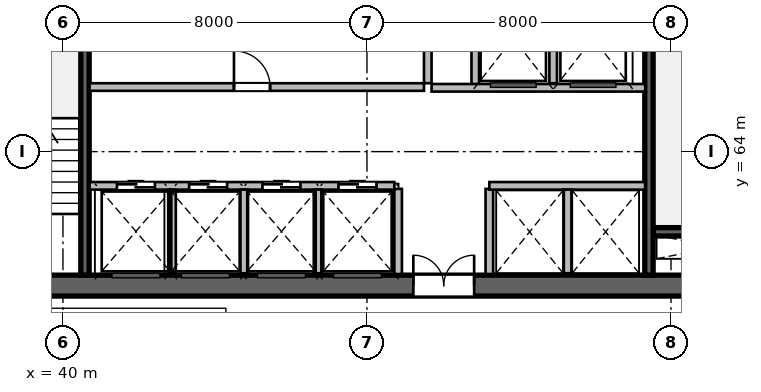
"""IFC4 building model, lengths in metres.
Left out: names, types, materials, properties, quantities, classifications, styles, units other than length and angle.
Written with IfcOpenShell. Run it as: python <this file> out.ifc"""

import sys

from ifc_helpers import new_model, si_unit, direction, frame, frame_2d, origin, place, context, subcontext, project, spatial, rectangle, extrude, source, transform, mapped, element, fill, save


model = new_model("IFC4")
c1 = context("Model", 3, precision=1e-05, world=origin(), true_north=direction((0.0, 1.0)))
c2 = subcontext(c1, "Body", "Model", "MODEL_VIEW")
j1 = project(units=[si_unit("LENGTHUNIT", "METRE"), si_unit("PLANEANGLEUNIT", "RADIAN")], contexts=[c1])
p1 = place(None, origin())
s1 = spatial("IfcSite", under=j1, at=p1, CompositionType="ELEMENT")
p2 = place(p1, origin())
s2 = spatial("IfcBuilding", under=s1, at=p2, CompositionType="ELEMENT")
p3 = place(p2, frame((0.0, 0.0, 49.8)))
s3 = spatial("IfcBuildingStorey", under=s2, at=p3, CompositionType="ELEMENT", Elevation=49.8)
m1 = source(origin(), c2, "Body", "SweptSolid", [
    extrude(rectangle(XDim=21.6, YDim=0.55, at=frame_2d((10.8, 0.0))), origin(), (0.0, 0.0, 1.0), 3.6),
])
p4 = place(p3, frame((37.2, 60.475, 0.0), z_axis=(0.0, 0.0, 1.0), x_axis=(1.0, 0.0, 0.0)))
e1 = element("IfcWall", 1, at=p4, inside=s3, PredefinedType="SHEAR", context=c2, shape_type="MappedRepresentation", body=[
    mapped(m1, transform((0.0, 0.0, 0.0), scale=1.0)),
])
p5 = place(p4, frame((1.1, 0.0, 0.0)))
e2 = element("IfcOpeningElement", 2, at=p5, cuts=e1, PredefinedType="OPENING", context=c2, shape_type="SweptSolid", body=[
    extrude(rectangle(XDim=1.15, YDim=2.15, at=frame_2d((0.575, 1.075))), frame((0.0, 0.285, 0.0), z_axis=(0.0, -1.0, 0.0), x_axis=(1.0, 0.0, 0.0)), (0.0, 0.0, 1.0), 0.57),
])
p6 = place(p4, frame((19.5, 0.0, 0.0)))
e3 = element("IfcOpeningElement", 3, at=p6, cuts=e1, PredefinedType="OPENING", context=c2, shape_type="SweptSolid", body=[
    extrude(rectangle(XDim=0.9, YDim=2.1, at=frame_2d((0.45, 1.05))), frame((0.0, 0.285, 0.0), z_axis=(0.0, -1.0, 0.0), x_axis=(1.0, 0.0, 0.0)), (0.0, 0.0, 1.0), 0.57),
])
p7 = place(p4, frame((12.02, 0.0, 0.0)))
e4 = element("IfcOpeningElement", 4, at=p7, cuts=e1, PredefinedType="OPENING", context=c2, shape_type="SweptSolid", body=[
    extrude(rectangle(XDim=1.6, YDim=2.15, at=frame_2d((0.8, 1.075))), frame((0.0, 0.285, 0.0), z_axis=(0.0, -1.0, 0.0), x_axis=(1.0, 0.0, 0.0)), (0.0, 0.0, 1.0), 0.57),
])
m2 = source(origin(), c2, "Body", "SweptSolid", [
    extrude(rectangle(XDim=3.27, YDim=0.22, at=frame_2d((1.635, 0.0))), origin(), (0.0, 0.0, 1.0), 3.6),
])
p8 = place(p3, frame((55.53, 61.89, 0.0), z_axis=(0.0, 0.0, 1.0), x_axis=(1.0, 0.0, 0.0)))
e5 = element("IfcWall", 5, at=p8, inside=s3, PredefinedType="SHEAR", context=c2, shape_type="MappedRepresentation", body=[
    mapped(m2, transform((0.0, 0.0, 0.0), scale=1.0)),
])
m3 = source(origin(), c2, "Body", "SweptSolid", [
    extrude(rectangle(XDim=10.9, YDim=0.22, at=frame_2d((5.45, 0.0))), origin(), (0.0, 0.0, 1.0), 3.6),
])
p9 = place(p3, frame((40.58, 60.75, 0.0), z_axis=(0.0, 0.0, 1.0), x_axis=(0.0, 1.0, 0.0)))
e6 = element("IfcWall", 6, at=p9, inside=s3, PredefinedType="SHEAR", context=c2, shape_type="MappedRepresentation", body=[
    mapped(m3, transform((0.0, 0.0, 0.0), scale=1.0)),
])
p10 = place(p3, frame((55.42, 60.75, 0.0), z_axis=(0.0, 0.0, 1.0), x_axis=(0.0, 1.0, 0.0)))
e7 = element("IfcWall", 7, at=p10, inside=s3, PredefinedType="SHEAR", context=c2, shape_type="MappedRepresentation", body=[
    mapped(m3, transform((0.0, 0.0, 0.0), scale=1.0)),
])
p11 = place(p10, frame((9.495, 0.0, 0.0)))
e8 = element("IfcOpeningElement", 8, at=p11, cuts=e7, PredefinedType="OPENING", context=c2, shape_type="SweptSolid", body=[
    extrude(rectangle(XDim=1.15, YDim=2.15, at=frame_2d((0.575, 1.075))), frame((0.0, 0.12, 0.0), z_axis=(0.0, -1.0, 0.0), x_axis=(1.0, 0.0, 0.0)), (0.0, 0.0, 1.0), 0.24),
])
m4 = source(origin(), c2, "Body", "SweptSolid", [
    extrude(rectangle(XDim=2.24, YDim=0.2, at=frame_2d((1.12, 0.0))), origin(), (0.0, 0.0, 1.0), 3.36),
])
for number, where, z_axis, x_axis in (
    (9, (48.82, 60.78, 0.0), (0.0, 0.0, 1.0), (0.0, 1.0, 0.0)),
    (10, (51.22, 60.78, 0.0), (0.0, 0.0, 1.0), (0.0, 1.0, 0.0)),
):
    element("IfcWall", number, at=place(p3, frame(where, z_axis=z_axis, x_axis=x_axis)), inside=s3, PredefinedType="SOLIDWALL", context=c2, shape_type="MappedRepresentation", body=[
        mapped(m4, transform((0.0, 0.0, 0.0), scale=1.0)),
    ])
m5 = source(origin(), c2, "Body", "SweptSolid", [
    extrude(rectangle(XDim=5.8, YDim=0.2, at=frame_2d((2.9, 0.0))), origin(), (0.0, 0.0, 1.0), 3.36),
])
p12 = place(p3, frame((49.6, 65.8, 0.0), z_axis=(0.0, 0.0, 1.0), x_axis=(0.0, 1.0, 0.0)))
e11 = element("IfcWall", 11, at=p12, inside=s3, PredefinedType="SOLIDWALL", context=c2, shape_type="MappedRepresentation", body=[
    mapped(m5, transform((0.0, 0.0, 0.0), scale=1.0)),
])
m6 = source(origin(), c2, "Body", "SweptSolid", [
    extrude(rectangle(XDim=2.58, YDim=0.2, at=frame_2d((1.29, 0.0))), origin(), (0.0, 0.0, 1.0), 3.36),
])
p13 = place(p3, frame((50.85, 65.68, 0.0), z_axis=(0.0, 0.0, 1.0), x_axis=(0.0, 1.0, 0.0)))
e12 = element("IfcWall", 12, at=p13, inside=s3, PredefinedType="SOLIDWALL", context=c2, shape_type="MappedRepresentation", body=[
    mapped(m6, transform((0.0, 0.0, 0.0), scale=1.0)),
])
m7 = source(origin(), c2, "Body", "SweptSolid", [
    extrude(rectangle(XDim=2.4, YDim=0.2, at=frame_2d((1.2, 0.0))), origin(), (0.0, 0.0, 1.0), 3.36),
])
p14 = place(p3, frame((52.9, 65.8, 0.0), z_axis=(0.0, 0.0, 1.0), x_axis=(0.0, 1.0, 0.0)))
e13 = element("IfcWall", 13, at=p14, inside=s3, PredefinedType="SOLIDWALL", context=c2, shape_type="MappedRepresentation", body=[
    mapped(m7, transform((0.0, 0.0, 0.0), scale=1.0)),
])
m8 = source(origin(), c2, "Body", "SweptSolid", [
    extrude(rectangle(XDim=5.62, YDim=0.2, at=frame_2d((2.81, 0.0))), origin(), (0.0, 0.0, 1.0), 3.36),
])
p15 = place(p3, frame((49.7, 65.68, 0.0), z_axis=(0.0, 0.0, 1.0), x_axis=(1.0, 0.0, 0.0)))
e14 = element("IfcWall", 14, at=p15, inside=s3, PredefinedType="SOLIDWALL", context=c2, shape_type="MappedRepresentation", body=[
    mapped(m8, transform((0.0, 0.0, 0.0), scale=1.0)),
])
m9 = source(origin(), c2, "Body", "SweptSolid", [
    extrude(rectangle(XDim=8.02, YDim=0.2, at=frame_2d((4.01, 0.0))), origin(), (0.0, 0.0, 1.0), 3.36),
])
p16 = place(p3, frame((40.7, 63.1, 0.0), z_axis=(0.0, 0.0, 1.0), x_axis=(1.0, 0.0, 0.0)))
e15 = element("IfcWall", 15, at=p16, inside=s3, PredefinedType="SOLIDWALL", context=c2, shape_type="MappedRepresentation", body=[
    mapped(m9, transform((0.0, 0.0, 0.0), scale=1.0)),
])
p17 = place(p16, frame((0.72, 0.0, 0.0)))
e16 = element("IfcOpeningElement", 16, at=p17, cuts=e15, PredefinedType="OPENING", context=c2, shape_type="SweptSolid", body=[
    extrude(rectangle(XDim=1.0, YDim=2.15, at=frame_2d((0.5, 1.075))), frame((0.0, 0.11, 0.0), z_axis=(0.0, -1.0, 0.0), x_axis=(1.0, 0.0, 0.0)), (0.0, 0.0, 1.0), 0.22),
])
p18 = place(p16, frame((2.62, 0.0, 0.0)))
e17 = element("IfcOpeningElement", 17, at=p18, cuts=e15, PredefinedType="OPENING", context=c2, shape_type="SweptSolid", body=[
    extrude(rectangle(XDim=1.0, YDim=2.15, at=frame_2d((0.5, 1.075))), frame((0.0, 0.11, 0.0), z_axis=(0.0, -1.0, 0.0), x_axis=(1.0, 0.0, 0.0)), (0.0, 0.0, 1.0), 0.22),
])
p19 = place(p16, frame((4.55, 0.0, 0.0)))
e18 = element("IfcOpeningElement", 18, at=p19, cuts=e15, PredefinedType="OPENING", context=c2, shape_type="SweptSolid", body=[
    extrude(rectangle(XDim=1.0, YDim=2.15, at=frame_2d((0.5, 1.075))), frame((0.0, 0.11, 0.0), z_axis=(0.0, -1.0, 0.0), x_axis=(1.0, 0.0, 0.0)), (0.0, 0.0, 1.0), 0.22),
])
p20 = place(p16, frame((6.55, 0.0, 0.0)))
e19 = element("IfcOpeningElement", 19, at=p20, cuts=e15, PredefinedType="OPENING", context=c2, shape_type="SweptSolid", body=[
    extrude(rectangle(XDim=1.0, YDim=2.15, at=frame_2d((0.5, 1.075))), frame((0.0, 0.11, 0.0), z_axis=(0.0, -1.0, 0.0), x_axis=(1.0, 0.0, 0.0)), (0.0, 0.0, 1.0), 0.22),
])
m10 = source(origin(), c2, "Body", "SweptSolid", [
    extrude(rectangle(XDim=4.1, YDim=0.2, at=frame_2d((2.05, 0.0))), origin(), (0.0, 0.0, 1.0), 3.36),
])
p21 = place(p3, frame((51.22, 63.1, 0.0), z_axis=(0.0, 0.0, 1.0), x_axis=(1.0, 0.0, 0.0)))
e20 = element("IfcWall", 20, at=p21, inside=s3, PredefinedType="SOLIDWALL", context=c2, shape_type="MappedRepresentation", body=[
    mapped(m10, transform((0.0, 0.0, 0.0), scale=1.0)),
])
m11 = source(origin(), c2, "Body", "SweptSolid", [
    extrude(rectangle(XDim=2.2, YDim=0.2, at=frame_2d((1.1, 0.0))), origin(), (0.0, 0.0, 1.0), 3.36),
])
for number, where, z_axis, x_axis in (
    (21, (42.87, 60.8, 0.0), (0.0, 0.0, 1.0), (0.0, 1.0, 0.0)),
    (22, (44.77, 60.8, 0.0), (0.0, 0.0, 1.0), (0.0, 1.0, 0.0)),
    (23, (46.7, 60.8, 0.0), (0.0, 0.0, 1.0), (0.0, 1.0, 0.0)),
    (24, (53.28, 60.8, 0.0), (0.0, 0.0, 1.0), (0.0, 1.0, 0.0)),
):
    element("IfcWall", number, at=place(p3, frame(where, z_axis=z_axis, x_axis=x_axis)), inside=s3, PredefinedType="SOLIDWALL", context=c2, shape_type="MappedRepresentation", body=[
        mapped(m11, transform((0.0, 0.0, 0.0), scale=1.0)),
    ])
m12 = source(origin(), c2, "Body", "SweptSolid", [
    extrude(rectangle(XDim=8.8, YDim=0.2, at=frame_2d((4.4, 0.0))), origin(), (0.0, 0.0, 1.0), 3.36),
])
p22 = place(p3, frame((40.7, 65.7, 0.0), z_axis=(0.0, 0.0, 1.0), x_axis=(1.0, 0.0, 0.0)))
e25 = element("IfcWall", 25, at=p22, inside=s3, PredefinedType="SOLIDWALL", context=c2, shape_type="MappedRepresentation", body=[
    mapped(m12, transform((0.0, 0.0, 0.0), scale=1.0)),
])
p23 = place(p22, frame((3.8, 0.0, 0.0)))
e26 = element("IfcOpeningElement", 26, at=p23, cuts=e25, PredefinedType="OPENING", context=c2, shape_type="SweptSolid", body=[
    extrude(rectangle(XDim=0.95, YDim=2.15, at=frame_2d((0.475, 1.075))), frame((0.0, 0.11, 0.0), z_axis=(0.0, -1.0, 0.0), x_axis=(1.0, 0.0, 0.0)), (0.0, 0.0, 1.0), 0.22),
])
m13 = source(origin(), c2, "Body", "SweptSolid", [
    extrude(rectangle(XDim=1.6, YDim=2.15, at=frame_2d((0.8, 1.075))), frame((0.0, 0.025, 0.0), z_axis=(0.0, -1.0, 0.0), x_axis=(1.0, 0.0, 0.0)), (0.0, 0.0, 1.0), 0.05),
])
p24 = place(p7, origin())
e27 = element("IfcDoor", 27, at=p24, inside=s3, OperationType="DOUBLE_DOOR_SINGLE_SWING", PredefinedType="DOOR", context=c2, shape_type="MappedRepresentation", body=[
    mapped(m13, transform((0.0, 0.0, 0.0), scale=1.0)),
])
fill(e4, e27)
m14 = source(origin(), c2, "Body", "SweptSolid", [
    extrude(rectangle(XDim=1.0, YDim=2.15, at=frame_2d((0.5, 1.075))), frame((0.0, 0.025, 0.0), z_axis=(0.0, -1.0, 0.0), x_axis=(1.0, 0.0, 0.0)), (0.0, 0.0, 1.0), 0.05),
])
p25 = place(p17, origin())
e28 = element("IfcDoor", 28, at=p25, inside=s3, OperationType="DOUBLE_DOOR_SLIDING", PredefinedType="DOOR", context=c2, shape_type="MappedRepresentation", body=[
    mapped(m14, transform((0.0, 0.0, 0.0), scale=1.0)),
])
fill(e16, e28)
p26 = place(p18, origin())
e29 = element("IfcDoor", 29, at=p26, inside=s3, OperationType="DOUBLE_DOOR_SLIDING", PredefinedType="DOOR", context=c2, shape_type="MappedRepresentation", body=[
    mapped(m14, transform((0.0, 0.0, 0.0), scale=1.0)),
])
fill(e17, e29)
p27 = place(p19, origin())
e30 = element("IfcDoor", 30, at=p27, inside=s3, OperationType="DOUBLE_DOOR_SLIDING", PredefinedType="DOOR", context=c2, shape_type="MappedRepresentation", body=[
    mapped(m14, transform((0.0, 0.0, 0.0), scale=1.0)),
])
fill(e18, e30)
p28 = place(p20, origin())
e31 = element("IfcDoor", 31, at=p28, inside=s3, OperationType="DOUBLE_DOOR_SLIDING", PredefinedType="DOOR", context=c2, shape_type="MappedRepresentation", body=[
    mapped(m14, transform((0.0, 0.0, 0.0), scale=1.0)),
])
fill(e19, e31)
m15 = source(origin(), c2, "Body", "SweptSolid", [
    extrude(rectangle(XDim=0.95, YDim=2.15, at=frame_2d((0.475, 1.075))), frame((0.0, 0.025, 0.0), z_axis=(0.0, -1.0, 0.0), x_axis=(1.0, 0.0, 0.0)), (0.0, 0.0, 1.0), 0.05),
])
p29 = place(p23, origin())
e32 = element("IfcDoor", 32, at=p29, inside=s3, OperationType="SINGLE_SWING_LEFT", PredefinedType="DOOR", context=c2, shape_type="MappedRepresentation", body=[
    mapped(m15, transform((0.0, 0.0, 0.0), scale=1.0)),
])
fill(e26, e32)
save(model, sys.argv[1])
